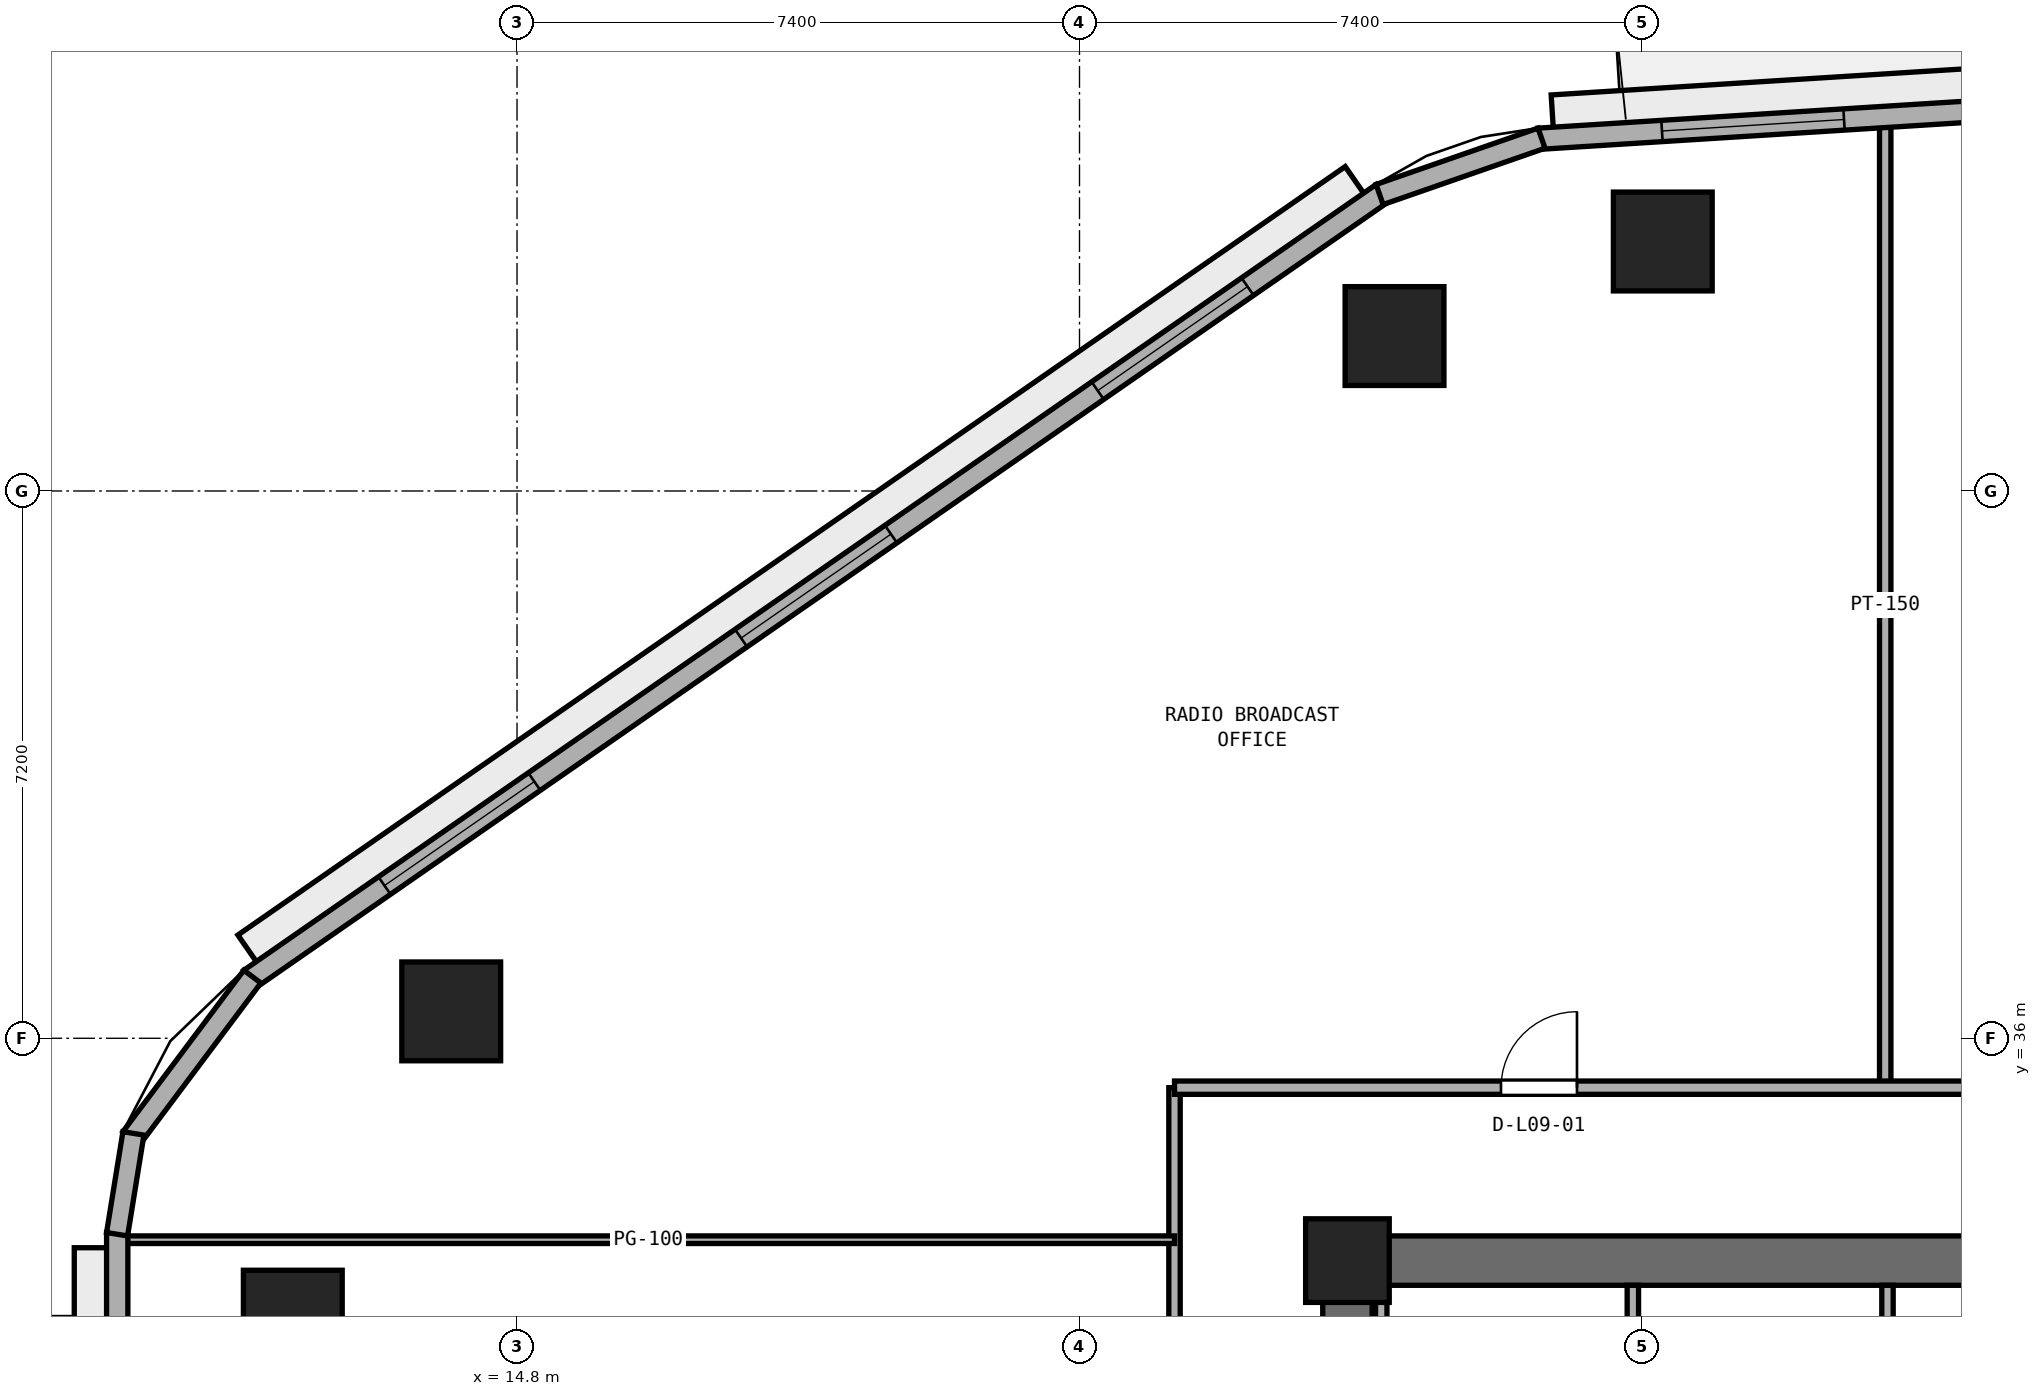
"""IFC4 building model, lengths in metres.
Left out: names, types, materials, properties, quantities, classifications, styles, units other than length and angle.
Written with IfcOpenShell. Run it as: python <this file> out.ifc"""

import sys

from ifc_helpers import new_model, si_unit, direction, frame, frame_2d, origin, origin_2d, place, context, subcontext, project, spatial, rectangle, extrude, element, fill, save


model = new_model("IFC4")
c1 = context("Model", 3, precision=1e-05, world=origin(), true_north=direction((0.0, 1.0)))
c2 = subcontext(c1, "Body", "Model", "MODEL_VIEW")
j1 = project(units=[si_unit("LENGTHUNIT", "METRE"), si_unit("PLANEANGLEUNIT", "RADIAN")], contexts=[c1])
p1 = place(None, origin())
s1 = spatial("IfcSite", under=j1, at=p1, CompositionType="ELEMENT")
p2 = place(p1, origin())
s2 = spatial("IfcBuilding", under=s1, at=p2, CompositionType="ELEMENT")
p3 = place(p2, frame((0.0, 0.0, 40.2)))
s3 = spatial("IfcBuildingStorey", under=s2, at=p3, CompositionType="ELEMENT", Elevation=40.2)
p4 = place(p3, frame((25.4, 33.075, 0.0), z_axis=(0.0, 0.0, 1.0), x_axis=(1.0, 0.0, 0.0)))
e1 = element("IfcWall", 1, at=p4, inside=s3, PredefinedType="SHEAR", context=c2, shape_type="SweptSolid", body=[
    extrude(rectangle(XDim=23.2, YDim=0.65, at=frame_2d((11.6, 0.0))), origin(), (0.0, 0.0, 1.0), 3.525),
])
p5 = place(p3, frame((25.725, 17.65, 0.0), z_axis=(0.0, 0.0, 1.0), x_axis=(0.0, 1.0, 0.0)))
e2 = element("IfcWall", 2, at=p5, inside=s3, PredefinedType="SHEAR", context=c2, shape_type="SweptSolid", body=[
    extrude(rectangle(XDim=15.1, YDim=0.65, at=frame_2d((7.55, 0.0))), origin(), (0.0, 0.0, 1.0), 3.525),
])
p6 = place(p5, frame((6.8, 0.0, 0.0)))
e3 = element("IfcOpeningElement", 3, at=p6, cuts=e2, PredefinedType="OPENING", context=c2, shape_type="SweptSolid", body=[
    extrude(rectangle(XDim=1.5, YDim=2.15, at=frame_2d((0.75, 1.075))), frame((0.0, 0.335, 0.0), z_axis=(0.0, -1.0, 0.0), x_axis=(1.0, 0.0, 0.0)), (0.0, 0.0, 1.0), 0.67),
])
p7 = place(p3, frame((25.725, 33.075, 0.0), z_axis=(0.0, 0.0, 1.0), x_axis=(1.0, 0.0, 0.0)))
e4 = element("IfcColumn", 4, at=p7, inside=s3, PredefinedType="PILASTER", context=c2, shape_type="SweptSolid", body=[
    extrude(rectangle(XDim=1.1, YDim=1.1, at=origin_2d()), origin(), (0.0, 0.0, 1.0), 3.8),
])
for number, where, z_axis, x_axis in (
    (5, (29.874, 46.482, 0.0), (0.0, 0.0, 1.0), (1.0, 0.0, 0.0)),
    (6, (26.344, 45.238, 0.0), (0.0, 0.0, 1.0), (1.0, 0.0, 0.0)),
    (7, (13.934, 36.354, 0.0), (0.0, 0.0, 1.0), (1.0, 0.0, 0.0)),
    (8, (11.85, 32.298, 0.0), (0.0, 0.0, 1.0), (1.0, 0.0, 0.0)),
):
    element("IfcColumn", number, at=place(p3, frame(where, z_axis=z_axis, x_axis=x_axis)), inside=s3, PredefinedType="COLUMN", context=c2, shape_type="SweptSolid", body=[
        extrude(rectangle(XDim=1.3, YDim=1.3, at=origin_2d()), origin(), (0.0, 0.0, 1.0), 3.8),
    ])
for number, where, z_axis, x_axis in (
    (9, (26.17, 30.65, 0.0), (0.0, 0.0, 1.0), (0.0, 1.0, 0.0)),
    (10, (29.48, 30.65, 0.0), (0.0, 0.0, 1.0), (0.0, 1.0, 0.0)),
    (11, (32.83, 30.65, 0.0), (0.0, 0.0, 1.0), (0.0, 1.0, 0.0)),
):
    element("IfcWall", number, at=place(p3, frame(where, z_axis=z_axis, x_axis=x_axis)), inside=s3, PredefinedType="PARTITIONING", context=c2, shape_type="SweptSolid", body=[
        extrude(rectangle(XDim=2.1, YDim=0.15, at=frame_2d((1.05, 0.0))), origin(), (0.0, 0.0, 1.0), 3.525),
    ])
p8 = place(p3, frame((32.8, 35.35, 0.0), z_axis=(0.0, 0.0, 1.0), x_axis=(0.0, 1.0, 0.0)))
e12 = element("IfcWall", 12, at=p8, inside=s3, PredefinedType="PARTITIONING", context=c2, shape_type="SweptSolid", body=[
    extrude(rectangle(XDim=12.707, YDim=0.15, at=frame_2d((6.353, 0.0))), origin(), (0.0, 0.0, 1.0), 3.525),
])
p9 = place(p3, frame((23.45, 15.05, 0.0), z_axis=(0.0, 0.0, 1.0), x_axis=(0.0, 1.0, 0.0)))
e13 = element("IfcWall", 13, at=p9, inside=s3, PredefinedType="PARTITIONING", context=c2, shape_type="SweptSolid", body=[
    extrude(rectangle(XDim=20.3, YDim=0.15, at=frame_2d((10.15, 0.0))), origin(), (0.0, 0.0, 1.0), 3.525),
])
p10 = place(p9, frame((8.025, 0.0, 0.0)))
e14 = element("IfcOpeningElement", 14, at=p10, cuts=e13, PredefinedType="OPENING", context=c2, shape_type="SweptSolid", body=[
    extrude(rectangle(XDim=0.9, YDim=2.1, at=frame_2d((0.45, 1.05))), frame((0.0, 0.085, 0.0), z_axis=(0.0, -1.0, 0.0), x_axis=(1.0, 0.0, 0.0)), (0.0, 0.0, 1.0), 0.17),
])
p11 = place(p9, frame((16.175, 0.0, 0.0)))
e15 = element("IfcOpeningElement", 15, at=p11, cuts=e13, PredefinedType="OPENING", context=c2, shape_type="SweptSolid", body=[
    extrude(rectangle(XDim=0.9, YDim=2.1, at=frame_2d((0.45, 1.05))), frame((0.0, 0.085, 0.0), z_axis=(0.0, -1.0, 0.0), x_axis=(1.0, 0.0, 0.0)), (0.0, 0.0, 1.0), 0.17),
])
p12 = place(p3, frame((9.605, 33.35, 0.0), z_axis=(0.0, 0.0, 1.0), x_axis=(1.0, 0.0, 0.0)))
e16 = element("IfcWall", 16, at=p12, inside=s3, PredefinedType="PARTITIONING", context=c2, shape_type="SweptSolid", body=[
    extrude(rectangle(XDim=13.845, YDim=0.1, at=frame_2d((6.922, 0.0))), origin(), (0.0, 0.0, 1.0), 3.525),
])
p13 = place(p3, frame((23.45, 35.35, 0.0), z_axis=(0.0, 0.0, 1.0), x_axis=(1.0, 0.0, 0.0)))
e17 = element("IfcWall", 17, at=p13, inside=s3, PredefinedType="PARTITIONING", context=c2, shape_type="SweptSolid", body=[
    extrude(rectangle(XDim=27.1, YDim=0.175, at=frame_2d((13.55, 0.0))), origin(), (0.0, 0.0, 1.0), 3.525),
])
p14 = place(p13, frame((4.295, 0.0, 0.0)))
e18 = element("IfcOpeningElement", 18, at=p14, cuts=e17, PredefinedType="OPENING", context=c2, shape_type="SweptSolid", body=[
    extrude(rectangle(XDim=1.0, YDim=2.12, at=frame_2d((0.5, 1.06))), frame((0.0, 0.097, 0.0), z_axis=(0.0, -1.0, 0.0), x_axis=(1.0, 0.0, 0.0)), (0.0, 0.0, 1.0), 0.195),
])
p15 = place(p13, frame((14.6, 0.0, 0.0)))
e19 = element("IfcOpeningElement", 19, at=p15, cuts=e17, PredefinedType="OPENING", context=c2, shape_type="SweptSolid", body=[
    extrude(rectangle(XDim=1.0, YDim=2.12, at=frame_2d((0.5, 1.06))), frame((0.0, 0.097, 0.0), z_axis=(0.0, -1.0, 0.0), x_axis=(1.0, 0.0, 0.0)), (0.0, 0.0, 1.0), 0.195),
])
p16 = place(p13, frame((23.405, 0.0, 0.0)))
e20 = element("IfcOpeningElement", 20, at=p16, cuts=e17, PredefinedType="OPENING", context=c2, shape_type="SweptSolid", body=[
    extrude(rectangle(XDim=0.9, YDim=2.1, at=frame_2d((0.45, 1.05))), frame((0.0, 0.097, 0.0), z_axis=(0.0, -1.0, 0.0), x_axis=(1.0, 0.0, 0.0)), (0.0, 0.0, 1.0), 0.195),
])
p17 = place(p3, frame((47.832, 49.069, 0.0), z_axis=(0.0, 0.0, 1.0), x_axis=(-0.998017725054, -0.062933460723, 0.0)))
e21 = element("IfcWall", 21, at=p17, inside=s3, PredefinedType="STANDARD", context=c2, shape_type="SweptSolid", body=[
    extrude(rectangle(XDim=19.629, YDim=0.28, at=frame_2d((9.815, 0.0))), origin(), (0.0, 0.0, 1.0), 3.525),
])
p18 = place(p17, frame((9.265, 0.0, 0.0)))
e22 = element("IfcOpeningElement", 22, at=p18, cuts=e21, PredefinedType="OPENING", context=c2, shape_type="SweptSolid", body=[
    extrude(rectangle(XDim=1.1, YDim=2.2, at=frame_2d((0.55, 1.1))), frame((0.0, 0.15, 0.0), z_axis=(0.0, -1.0, 0.0), x_axis=(1.0, 0.0, 0.0)), (0.0, 0.0, 1.0), 0.3),
])
p19 = place(p17, frame((15.604, 0.0, 0.9)))
e23 = element("IfcOpeningElement", 23, at=p19, cuts=e21, PredefinedType="OPENING", context=c2, shape_type="SweptSolid", body=[
    extrude(rectangle(XDim=2.4, YDim=1.75, at=frame_2d((1.2, 0.875))), frame((0.0, 0.15, 0.0), z_axis=(0.0, -1.0, 0.0), x_axis=(1.0, 0.0, 0.0)), (0.0, 0.0, 1.0), 0.3),
])
p20 = place(p3, frame((26.182, 47.118, 0.0), z_axis=(0.0, 0.0, 1.0), x_axis=(-0.821547956627, -0.570139417127, 0.0)))
e24 = element("IfcWall", 24, at=p20, inside=s3, PredefinedType="STANDARD", context=c2, shape_type="SweptSolid", body=[
    extrude(rectangle(XDim=18.132, YDim=0.28, at=frame_2d((9.066, 0.0))), origin(), (0.0, 0.0, 1.0), 3.525),
])
p21 = place(p20, frame((2.156, 0.0, 0.9)))
e25 = element("IfcOpeningElement", 25, at=p21, cuts=e24, PredefinedType="OPENING", context=c2, shape_type="SweptSolid", body=[
    extrude(rectangle(XDim=2.4, YDim=1.75, at=frame_2d((1.2, 0.875))), frame((0.0, 0.15, 0.0), z_axis=(0.0, -1.0, 0.0), x_axis=(1.0, 0.0, 0.0)), (0.0, 0.0, 1.0), 0.3),
])
p22 = place(p20, frame((7.866, 0.0, 0.9)))
e26 = element("IfcOpeningElement", 26, at=p22, cuts=e24, PredefinedType="OPENING", context=c2, shape_type="SweptSolid", body=[
    extrude(rectangle(XDim=2.4, YDim=1.75, at=frame_2d((1.2, 0.875))), frame((0.0, 0.15, 0.0), z_axis=(0.0, -1.0, 0.0), x_axis=(1.0, 0.0, 0.0)), (0.0, 0.0, 1.0), 0.3),
])
p23 = place(p20, frame((13.577, 0.0, 0.9)))
e27 = element("IfcOpeningElement", 27, at=p23, cuts=e24, PredefinedType="OPENING", context=c2, shape_type="SweptSolid", body=[
    extrude(rectangle(XDim=2.4, YDim=1.75, at=frame_2d((1.2, 0.875))), frame((0.0, 0.15, 0.0), z_axis=(0.0, -1.0, 0.0), x_axis=(1.0, 0.0, 0.0)), (0.0, 0.0, 1.0), 0.3),
])
p24 = place(p3, frame((9.54, 33.444, 0.0), z_axis=(0.0, 0.0, 1.0), x_axis=(0.0, -1.0, 0.0)))
e28 = element("IfcWall", 28, at=p24, inside=s3, PredefinedType="STANDARD", context=c2, shape_type="SweptSolid", body=[
    extrude(rectangle(XDim=17.301, YDim=0.28, at=frame_2d((8.65, 0.0))), origin(), (0.0, 0.0, 1.0), 3.525),
])
p25 = place(p24, frame((8.1, 0.0, 0.0)))
e29 = element("IfcOpeningElement", 29, at=p25, cuts=e28, PredefinedType="OPENING", context=c2, shape_type="SweptSolid", body=[
    extrude(rectangle(XDim=1.1, YDim=2.2, at=frame_2d((0.55, 1.1))), frame((0.0, 0.15, 0.0), z_axis=(0.0, -1.0, 0.0), x_axis=(1.0, 0.0, 0.0)), (0.0, 0.0, 1.0), 0.3),
])
p26 = place(p24, frame((12.884, 0.0, 0.9)))
e30 = element("IfcOpeningElement", 30, at=p26, cuts=e28, PredefinedType="OPENING", context=c2, shape_type="SweptSolid", body=[
    extrude(rectangle(XDim=2.4, YDim=1.75, at=frame_2d((1.2, 0.875))), frame((0.0, 0.15, 0.0), z_axis=(0.0, -1.0, 0.0), x_axis=(1.0, 0.0, 0.0)), (0.0, 0.0, 1.0), 0.3),
])
p27 = place(p3, frame((28.278, 47.842, 0.0), z_axis=(0.0, 0.0, 1.0), x_axis=(-0.9444559001, -0.328638179106, 0.0)))
e31 = element("IfcWall", 31, at=p27, inside=s3, PredefinedType="STANDARD", context=c2, shape_type="SweptSolid", body=[
    extrude(rectangle(XDim=2.255, YDim=0.28, at=frame_2d((1.128, 0.0))), origin(), (0.0, 0.0, 1.0), 3.525),
])
p28 = place(p3, frame((11.318, 36.811, 0.0), z_axis=(0.0, 0.0, 1.0), x_axis=(-0.599455152629, -0.800408345775, 0.0)))
e32 = element("IfcWall", 32, at=p28, inside=s3, PredefinedType="STANDARD", context=c2, shape_type="SweptSolid", body=[
    extrude(rectangle(XDim=2.653, YDim=0.28, at=frame_2d((1.327, 0.0))), origin(), (0.0, 0.0, 1.0), 3.525),
])
p29 = place(p3, frame((9.753, 34.749, 0.0), z_axis=(0.0, 0.0, 1.0), x_axis=(-0.160037671962, -0.987110907423, 0.0)))
e33 = element("IfcWall", 33, at=p29, inside=s3, PredefinedType="STANDARD", context=c2, shape_type="SweptSolid", body=[
    extrude(rectangle(XDim=1.344, YDim=0.28, at=frame_2d((0.672, 0.0))), origin(), (0.0, 0.0, 1.0), 3.525),
])
p30 = place(p14, origin())
e34 = element("IfcDoor", 34, at=p30, inside=s3, OperationType="SINGLE_SWING_RIGHT", PredefinedType="DOOR", context=c2, shape_type="SweptSolid", body=[
    extrude(rectangle(XDim=1.0, YDim=2.12, at=frame_2d((0.5, 1.06))), frame((0.0, 0.025, 0.0), z_axis=(0.0, -1.0, 0.0), x_axis=(1.0, 0.0, 0.0)), (0.0, 0.0, 1.0), 0.05),
])
fill(e18, e34)
p31 = place(p19, origin())
e35 = element("IfcWindow", 35, at=p31, inside=s3, PartitioningType="SINGLE_PANEL", PredefinedType="WINDOW", context=c2, shape_type="SweptSolid", body=[
    extrude(rectangle(XDim=2.4, YDim=1.75, at=frame_2d((1.2, 0.875))), frame((0.0, 0.03, 0.0), z_axis=(0.0, -1.0, 0.0), x_axis=(1.0, 0.0, 0.0)), (0.0, 0.0, 1.0), 0.06),
])
fill(e23, e35)
p32 = place(p21, origin())
e36 = element("IfcWindow", 36, at=p32, inside=s3, PartitioningType="SINGLE_PANEL", PredefinedType="WINDOW", context=c2, shape_type="SweptSolid", body=[
    extrude(rectangle(XDim=2.4, YDim=1.75, at=frame_2d((1.2, 0.875))), frame((0.0, 0.03, 0.0), z_axis=(0.0, -1.0, 0.0), x_axis=(1.0, 0.0, 0.0)), (0.0, 0.0, 1.0), 0.06),
])
fill(e25, e36)
p33 = place(p22, origin())
e37 = element("IfcWindow", 37, at=p33, inside=s3, PartitioningType="SINGLE_PANEL", PredefinedType="WINDOW", context=c2, shape_type="SweptSolid", body=[
    extrude(rectangle(XDim=2.4, YDim=1.75, at=frame_2d((1.2, 0.875))), frame((0.0, 0.03, 0.0), z_axis=(0.0, -1.0, 0.0), x_axis=(1.0, 0.0, 0.0)), (0.0, 0.0, 1.0), 0.06),
])
fill(e26, e37)
p34 = place(p23, origin())
e38 = element("IfcWindow", 38, at=p34, inside=s3, PartitioningType="SINGLE_PANEL", PredefinedType="WINDOW", context=c2, shape_type="SweptSolid", body=[
    extrude(rectangle(XDim=2.4, YDim=1.75, at=frame_2d((1.2, 0.875))), frame((0.0, 0.03, 0.0), z_axis=(0.0, -1.0, 0.0), x_axis=(1.0, 0.0, 0.0)), (0.0, 0.0, 1.0), 0.06),
])
fill(e27, e38)
save(model, sys.argv[1])
